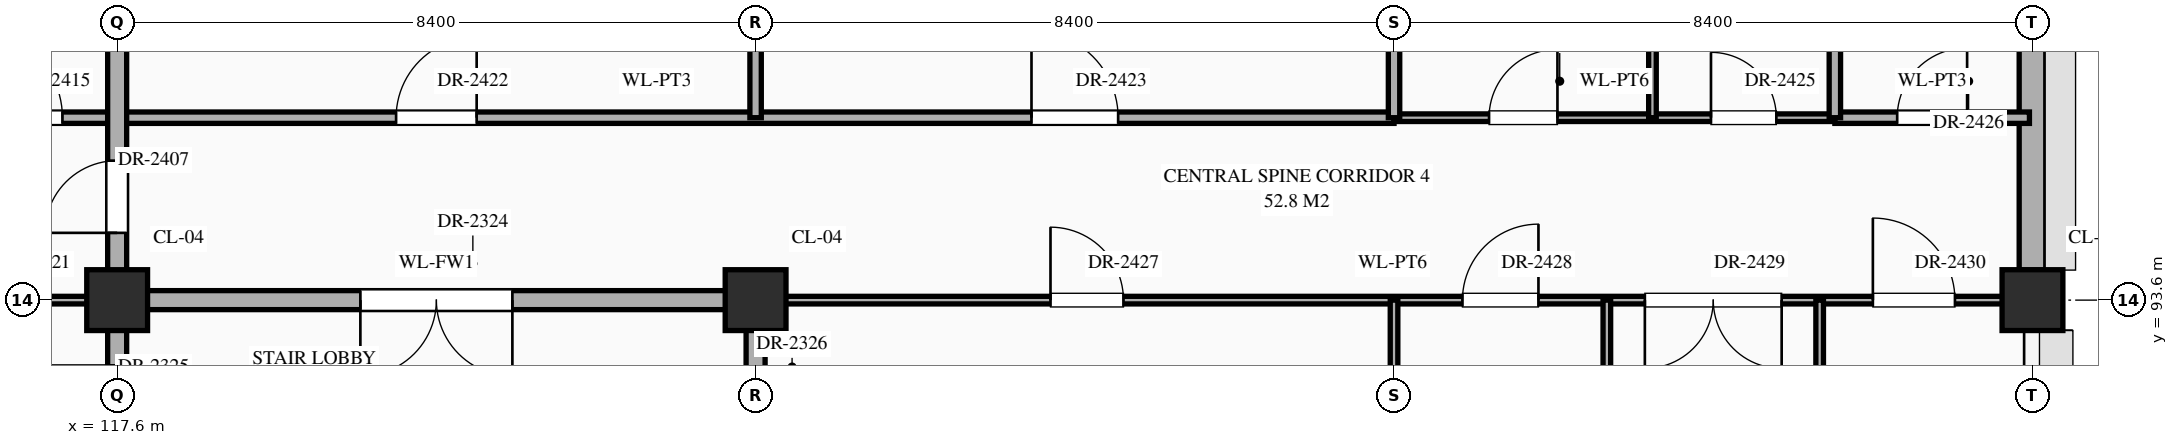
"""IFC4 building model, lengths in metres.
Left out: names, types, materials, properties, quantities, classifications, styles, units other than length and angle.
Written with IfcOpenShell. Run it as: python <this file> out.ifc"""

import sys

from ifc_helpers import new_model, si_unit, direction, frame, frame_2d, origin, origin_2d, place, context, subcontext, project, spatial, rectangle, extrude, element, fill, save


model = new_model("IFC4")
c1 = context("Model", 3, precision=1e-05, world=origin(), true_north=direction((0.0, 1.0)))
c2 = subcontext(c1, "Body", "Model", "MODEL_VIEW")
j1 = project(units=[si_unit("LENGTHUNIT", "METRE"), si_unit("PLANEANGLEUNIT", "RADIAN")], contexts=[c1])
p1 = place(None, origin())
s1 = spatial("IfcSite", under=j1, at=p1, CompositionType="ELEMENT")
p2 = place(p1, origin())
s2 = spatial("IfcBuilding", under=s1, at=p2, CompositionType="ELEMENT")
p3 = place(p2, frame((0.0, 0.0, 30.6)))
s3 = spatial("IfcBuildingStorey", under=s2, at=p3, CompositionType="ELEMENT", Elevation=30.6)
for number, where, z_axis, x_axis in (
    (1, (117.6, 93.6, 0.0), (0.0, 0.0, 1.0), (1.0, 0.0, 0.0)),
    (2, (126.0, 93.6, 0.0), (0.0, 0.0, 1.0), (1.0, 0.0, 0.0)),
    (3, (142.8, 93.6, 0.0), (0.0, 0.0, 1.0), (1.0, 0.0, 0.0)),
):
    element("IfcColumn", number, at=place(p3, frame(where, z_axis=z_axis, x_axis=x_axis)), inside=s3, PredefinedType="COLUMN", context=c2, shape_type="SweptSolid", body=[
        extrude(rectangle(XDim=0.8, YDim=0.8, at=origin_2d()), origin(), (0.0, 0.0, 1.0), 4.5),
    ])
p4 = place(p3, frame((142.8, 93.995, 0.0), z_axis=(0.0, 0.0, 1.0), x_axis=(0.0, 1.0, 0.0)))
e4 = element("IfcWall", 4, at=p4, inside=s3, PredefinedType="STANDARD", context=c2, shape_type="SweptSolid", body=[
    extrude(rectangle(XDim=6.41, YDim=0.35, at=frame_2d((3.205, 0.0))), origin(), (0.0, 0.0, 1.0), 3.65),
])
p5 = place(p4, frame((4.055, 0.0, 0.85)))
e5 = element("IfcOpeningElement", 5, at=p5, cuts=e4, PredefinedType="OPENING", context=c2, shape_type="SweptSolid", body=[
    extrude(rectangle(XDim=0.9, YDim=2.12, at=frame_2d((0.45, 1.06))), frame((0.0, 0.187, 0.0), z_axis=(0.0, -1.0, 0.0), x_axis=(1.0, 0.0, 0.0)), (0.0, 0.0, 1.0), 0.374),
])
p6 = place(p3, frame((109.2, 93.6, 0.0), z_axis=(0.0, 0.0, 1.0), x_axis=(1.0, 0.0, 0.0)))
e6 = element("IfcWall", 6, at=p6, inside=s3, PredefinedType="STANDARD", context=c2, shape_type="SweptSolid", body=[
    extrude(rectangle(XDim=8.4, YDim=0.1, at=frame_2d((4.2, 0.0))), origin(), (0.0, 0.0, 1.0), 3.39),
])
p7 = place(p6, frame((1.09, 0.0, 0.0)))
e7 = element("IfcOpeningElement", 7, at=p7, cuts=e6, PredefinedType="OPENING", context=c2, shape_type="SweptSolid", body=[
    extrude(rectangle(XDim=0.94, YDim=2.3, at=frame_2d((0.47, 1.15))), frame((0.0, 0.062, 0.0), z_axis=(0.0, -1.0, 0.0), x_axis=(1.0, 0.0, 0.0)), (0.0, 0.0, 1.0), 0.124),
])
p8 = place(p6, frame((3.71, 0.0, 0.0)))
e8 = element("IfcOpeningElement", 8, at=p8, cuts=e6, PredefinedType="OPENING", context=c2, shape_type="SweptSolid", body=[
    extrude(rectangle(XDim=0.98, YDim=2.35, at=frame_2d((0.49, 1.175))), frame((0.0, 0.062, 0.0), z_axis=(0.0, -1.0, 0.0), x_axis=(1.0, 0.0, 0.0)), (0.0, 0.0, 1.0), 0.124),
])
p9 = place(p6, frame((6.33, 0.0, 0.0)))
e9 = element("IfcOpeningElement", 9, at=p9, cuts=e6, PredefinedType="OPENING", context=c2, shape_type="SweptSolid", body=[
    extrude(rectangle(XDim=1.02, YDim=2.4, at=frame_2d((0.51, 1.2))), frame((0.0, 0.062, 0.0), z_axis=(0.0, -1.0, 0.0), x_axis=(1.0, 0.0, 0.0)), (0.0, 0.0, 1.0), 0.124),
])
p10 = place(p3, frame((117.6, 93.6, 0.0), z_axis=(0.0, 0.0, 1.0), x_axis=(1.0, 0.0, 0.0)))
e10 = element("IfcWall", 10, at=p10, inside=s3, PredefinedType="STANDARD", context=c2, shape_type="SweptSolid", body=[
    extrude(rectangle(XDim=8.4, YDim=0.25, at=frame_2d((4.2, 0.0))), origin(), (0.0, 0.0, 1.0), 3.39),
])
p11 = place(p10, frame((3.2, 0.0, 0.0)))
e11 = element("IfcOpeningElement", 11, at=p11, cuts=e10, PredefinedType="OPENING", context=c2, shape_type="SweptSolid", body=[
    extrude(rectangle(XDim=2.0, YDim=2.4, at=frame_2d((1.0, 1.2))), frame((0.0, 0.137, 0.0), z_axis=(0.0, -1.0, 0.0), x_axis=(1.0, 0.0, 0.0)), (0.0, 0.0, 1.0), 0.274),
])
p12 = place(p3, frame((126.0, 93.6, 0.0), z_axis=(0.0, 0.0, 1.0), x_axis=(1.0, 0.0, 0.0)))
e12 = element("IfcWall", 12, at=p12, inside=s3, PredefinedType="STANDARD", context=c2, shape_type="SweptSolid", body=[
    extrude(rectangle(XDim=16.76, YDim=0.1, at=frame_2d((8.38, 0.0))), origin(), (0.0, 0.0, 1.0), 3.1),
])
p13 = place(p12, frame((3.88, 0.0, 0.0)))
e13 = element("IfcOpeningElement", 13, at=p13, cuts=e12, PredefinedType="OPENING", context=c2, shape_type="SweptSolid", body=[
    extrude(rectangle(XDim=0.96, YDim=2.2, at=frame_2d((0.48, 1.1))), frame((0.0, 0.062, 0.0), z_axis=(0.0, -1.0, 0.0), x_axis=(1.0, 0.0, 0.0)), (0.0, 0.0, 1.0), 0.124),
])
p14 = place(p12, frame((9.3, 0.0, 0.0)))
e14 = element("IfcOpeningElement", 14, at=p14, cuts=e12, PredefinedType="OPENING", context=c2, shape_type="SweptSolid", body=[
    extrude(rectangle(XDim=1.0, YDim=2.25, at=frame_2d((0.5, 1.125))), frame((0.0, 0.062, 0.0), z_axis=(0.0, -1.0, 0.0), x_axis=(1.0, 0.0, 0.0)), (0.0, 0.0, 1.0), 0.124),
])
p15 = place(p12, frame((11.7, 0.0, 0.0)))
e15 = element("IfcOpeningElement", 15, at=p15, cuts=e12, PredefinedType="OPENING", context=c2, shape_type="SweptSolid", body=[
    extrude(rectangle(XDim=1.8, YDim=2.5, at=frame_2d((0.9, 1.25))), frame((0.0, 0.062, 0.0), z_axis=(0.0, -1.0, 0.0), x_axis=(1.0, 0.0, 0.0)), (0.0, 0.0, 1.0), 0.124),
])
p16 = place(p12, frame((14.7, 0.0, 0.0)))
e16 = element("IfcOpeningElement", 16, at=p16, cuts=e12, PredefinedType="OPENING", context=c2, shape_type="SweptSolid", body=[
    extrude(rectangle(XDim=1.08, YDim=2.25, at=frame_2d((0.54, 1.125))), frame((0.0, 0.062, 0.0), z_axis=(0.0, -1.0, 0.0), x_axis=(1.0, 0.0, 0.0)), (0.0, 0.0, 1.0), 0.124),
])
p17 = place(p3, frame((115.0, 96.0, 0.0), z_axis=(0.0, 0.0, 1.0), x_axis=(1.0, 0.0, 0.0)))
e17 = element("IfcWall", 17, at=p17, inside=s3, PredefinedType="STANDARD", context=c2, shape_type="SweptSolid", body=[
    extrude(rectangle(XDim=19.4, YDim=0.15, at=frame_2d((9.7, 0.0))), origin(), (0.0, 0.0, 1.0), 4.24),
])
p18 = place(p17, frame((0.72, 0.0, 0.0)))
e18 = element("IfcOpeningElement", 18, at=p18, cuts=e17, PredefinedType="OPENING", context=c2, shape_type="SweptSolid", body=[
    extrude(rectangle(XDim=1.16, YDim=2.3, at=frame_2d((0.58, 1.15))), frame((0.0, 0.087, 0.0), z_axis=(0.0, -1.0, 0.0), x_axis=(1.0, 0.0, 0.0)), (0.0, 0.0, 1.0), 0.174),
])
p19 = place(p17, frame((6.27, 0.0, 0.0)))
e19 = element("IfcOpeningElement", 19, at=p19, cuts=e17, PredefinedType="OPENING", context=c2, shape_type="SweptSolid", body=[
    extrude(rectangle(XDim=1.06, YDim=2.4, at=frame_2d((0.53, 1.2))), frame((0.0, 0.087, 0.0), z_axis=(0.0, -1.0, 0.0), x_axis=(1.0, 0.0, 0.0)), (0.0, 0.0, 1.0), 0.174),
])
p20 = place(p17, frame((14.63, 0.0, 0.0)))
e20 = element("IfcOpeningElement", 20, at=p20, cuts=e17, PredefinedType="OPENING", context=c2, shape_type="SweptSolid", body=[
    extrude(rectangle(XDim=1.14, YDim=2.4, at=frame_2d((0.57, 1.2))), frame((0.0, 0.087, 0.0), z_axis=(0.0, -1.0, 0.0), x_axis=(1.0, 0.0, 0.0)), (0.0, 0.0, 1.0), 0.174),
])
p21 = place(p3, frame((134.4, 96.0, 0.0), z_axis=(0.0, 0.0, 1.0), x_axis=(1.0, 0.0, 0.0)))
e21 = element("IfcWall", 21, at=p21, inside=s3, PredefinedType="STANDARD", context=c2, shape_type="SweptSolid", body=[
    extrude(rectangle(XDim=5.8, YDim=0.1, at=frame_2d((2.9, 0.0))), origin(), (0.0, 0.0, 1.0), 4.3),
])
p22 = place(p21, frame((1.25, 0.0, 0.0)))
e22 = element("IfcOpeningElement", 22, at=p22, cuts=e21, PredefinedType="OPENING", context=c2, shape_type="SweptSolid", body=[
    extrude(rectangle(XDim=0.9, YDim=2.15, at=frame_2d((0.45, 1.075))), frame((0.0, 0.062, 0.0), z_axis=(0.0, -1.0, 0.0), x_axis=(1.0, 0.0, 0.0)), (0.0, 0.0, 1.0), 0.124),
])
p23 = place(p21, frame((4.17, 0.0, 0.0)))
e23 = element("IfcOpeningElement", 23, at=p23, cuts=e21, PredefinedType="OPENING", context=c2, shape_type="SweptSolid", body=[
    extrude(rectangle(XDim=0.86, YDim=2.1, at=frame_2d((0.43, 1.05))), frame((0.0, 0.062, 0.0), z_axis=(0.0, -1.0, 0.0), x_axis=(1.0, 0.0, 0.0)), (0.0, 0.0, 1.0), 0.124),
])
p24 = place(p3, frame((140.2, 96.0, 0.0), z_axis=(0.0, 0.0, 1.0), x_axis=(1.0, 0.0, 0.0)))
e24 = element("IfcWall", 24, at=p24, inside=s3, PredefinedType="STANDARD", context=c2, shape_type="SweptSolid", body=[
    extrude(rectangle(XDim=2.56, YDim=0.15, at=frame_2d((1.28, 0.0))), origin(), (0.0, 0.0, 1.0), 4.3),
])
p25 = place(p24, frame((0.82, 0.0, 0.0)))
e25 = element("IfcOpeningElement", 25, at=p25, cuts=e24, PredefinedType="OPENING", context=c2, shape_type="SweptSolid", body=[
    extrude(rectangle(XDim=0.92, YDim=2.15, at=frame_2d((0.46, 1.075))), frame((0.0, 0.087, 0.0), z_axis=(0.0, -1.0, 0.0), x_axis=(1.0, 0.0, 0.0)), (0.0, 0.0, 1.0), 0.174),
])
p26 = place(p3, frame((117.6, 91.2, 0.0), z_axis=(0.0, 0.0, 1.0), x_axis=(0.0, 1.0, 0.0)))
e26 = element("IfcWall", 26, at=p26, inside=s3, PredefinedType="STANDARD", context=c2, shape_type="SweptSolid", body=[
    extrude(rectangle(XDim=13.2, YDim=0.25, at=frame_2d((6.6, 0.0))), origin(), (0.0, 0.0, 1.0), 3.49),
])
p27 = place(p26, frame((0.54, 0.0, 0.0)))
e27 = element("IfcOpeningElement", 27, at=p27, cuts=e26, PredefinedType="OPENING", context=c2, shape_type="SweptSolid", body=[
    extrude(rectangle(XDim=1.0, YDim=2.2, at=frame_2d((0.5, 1.1))), frame((0.0, 0.137, 0.0), z_axis=(0.0, -1.0, 0.0), x_axis=(1.0, 0.0, 0.0)), (0.0, 0.0, 1.0), 0.274),
])
p28 = place(p26, frame((10.485, 0.0, 0.0)))
e28 = element("IfcOpeningElement", 28, at=p28, cuts=e26, PredefinedType="OPENING", context=c2, shape_type="SweptSolid", body=[
    extrude(rectangle(XDim=0.95, YDim=2.15, at=frame_2d((0.475, 1.075))), frame((0.0, 0.137, 0.0), z_axis=(0.0, -1.0, 0.0), x_axis=(1.0, 0.0, 0.0)), (0.0, 0.0, 1.0), 0.274),
])
p29 = place(p26, frame((3.285, 0.0, 0.0)))
e29 = element("IfcOpeningElement", 29, at=p29, cuts=e26, PredefinedType="OPENING", context=c2, shape_type="SweptSolid", body=[
    extrude(rectangle(XDim=0.95, YDim=2.15, at=frame_2d((0.475, 1.075))), frame((0.0, 0.137, 0.0), z_axis=(0.0, -1.0, 0.0), x_axis=(1.0, 0.0, 0.0)), (0.0, 0.0, 1.0), 0.274),
])
p30 = place(p3, frame((126.0, 91.2, 0.0), z_axis=(0.0, 0.0, 1.0), x_axis=(0.0, 1.0, 0.0)))
e30 = element("IfcWall", 30, at=p30, inside=s3, PredefinedType="STANDARD", context=c2, shape_type="SweptSolid", body=[
    extrude(rectangle(XDim=2.4, YDim=0.25, at=frame_2d((1.2, 0.0))), origin(), (0.0, 0.0, 1.0), 3.4),
])
p31 = place(p30, frame((0.565, 0.0, 0.0)))
e31 = element("IfcOpeningElement", 31, at=p31, cuts=e30, PredefinedType="OPENING", context=c2, shape_type="SweptSolid", body=[
    extrude(rectangle(XDim=0.95, YDim=2.15, at=frame_2d((0.475, 1.075))), frame((0.0, 0.137, 0.0), z_axis=(0.0, -1.0, 0.0), x_axis=(1.0, 0.0, 0.0)), (0.0, 0.0, 1.0), 0.274),
])
p32 = place(p3, frame((126.0, 96.0, 0.0), z_axis=(0.0, 0.0, 1.0), x_axis=(0.0, 1.0, 0.0)))
e32 = element("IfcWall", 32, at=p32, inside=s3, PredefinedType="STANDARD", context=c2, shape_type="SweptSolid", body=[
    extrude(rectangle(XDim=4.8, YDim=0.15, at=frame_2d((2.4, 0.0))), origin(), (0.0, 0.0, 1.0), 3.4),
])
p33 = place(p3, frame((134.4, 86.4, 0.0), z_axis=(0.0, 0.0, 1.0), x_axis=(0.0, 1.0, 0.0)))
e33 = element("IfcWall", 33, at=p33, inside=s3, PredefinedType="STANDARD", context=c2, shape_type="SweptSolid", body=[
    extrude(rectangle(XDim=7.2, YDim=0.1, at=frame_2d((3.6, 0.0))), origin(), (0.0, 0.0, 1.0), 4.15),
])
p34 = place(p3, frame((134.4, 96.0, 0.0), z_axis=(0.0, 0.0, 1.0), x_axis=(0.0, 1.0, 0.0)))
e34 = element("IfcWall", 34, at=p34, inside=s3, PredefinedType="STANDARD", context=c2, shape_type="SweptSolid", body=[
    extrude(rectangle(XDim=4.8, YDim=0.15, at=frame_2d((2.4, 0.0))), origin(), (0.0, 0.0, 1.0), 4.15),
])
p35 = place(p3, frame((137.2, 86.4, 0.0), z_axis=(0.0, 0.0, 1.0), x_axis=(0.0, 1.0, 0.0)))
e35 = element("IfcWall", 35, at=p35, inside=s3, PredefinedType="STANDARD", context=c2, shape_type="SweptSolid", body=[
    extrude(rectangle(XDim=7.2, YDim=0.1, at=frame_2d((3.6, 0.0))), origin(), (0.0, 0.0, 1.0), 4.3),
])
p36 = place(p35, frame((3.08, 0.0, 0.0)))
e36 = element("IfcOpeningElement", 36, at=p36, cuts=e35, PredefinedType="OPENING", context=c2, shape_type="SweptSolid", body=[
    extrude(rectangle(XDim=1.04, YDim=2.2, at=frame_2d((0.52, 1.1))), frame((0.0, 0.062, 0.0), z_axis=(0.0, -1.0, 0.0), x_axis=(1.0, 0.0, 0.0)), (0.0, 0.0, 1.0), 0.124),
])
p37 = place(p3, frame((137.8, 96.0, 0.0), z_axis=(0.0, 0.0, 1.0), x_axis=(0.0, 1.0, 0.0)))
e37 = element("IfcWall", 37, at=p37, inside=s3, PredefinedType="STANDARD", context=c2, shape_type="SweptSolid", body=[
    extrude(rectangle(XDim=4.8, YDim=0.1, at=frame_2d((2.4, 0.0))), origin(), (0.0, 0.0, 1.0), 4.3),
])
p38 = place(p37, frame((1.87, 0.0, 0.0)))
e38 = element("IfcOpeningElement", 38, at=p38, cuts=e37, PredefinedType="OPENING", context=c2, shape_type="SweptSolid", body=[
    extrude(rectangle(XDim=1.06, YDim=2.4, at=frame_2d((0.53, 1.2))), frame((0.0, 0.062, 0.0), z_axis=(0.0, -1.0, 0.0), x_axis=(1.0, 0.0, 0.0)), (0.0, 0.0, 1.0), 0.124),
])
p39 = place(p3, frame((140.0, 86.4, 0.0), z_axis=(0.0, 0.0, 1.0), x_axis=(0.0, 1.0, 0.0)))
e39 = element("IfcWall", 39, at=p39, inside=s3, PredefinedType="STANDARD", context=c2, shape_type="SweptSolid", body=[
    extrude(rectangle(XDim=7.2, YDim=0.1, at=frame_2d((3.6, 0.0))), origin(), (0.0, 0.0, 1.0), 4.3),
])
p40 = place(p39, frame((3.04, 0.0, 0.0)))
e40 = element("IfcOpeningElement", 40, at=p40, cuts=e39, PredefinedType="OPENING", context=c2, shape_type="SweptSolid", body=[
    extrude(rectangle(XDim=1.12, YDim=2.25, at=frame_2d((0.56, 1.125))), frame((0.0, 0.062, 0.0), z_axis=(0.0, -1.0, 0.0), x_axis=(1.0, 0.0, 0.0)), (0.0, 0.0, 1.0), 0.124),
])
p41 = place(p3, frame((140.2, 96.0, 0.0), z_axis=(0.0, 0.0, 1.0), x_axis=(0.0, 1.0, 0.0)))
e41 = element("IfcWall", 41, at=p41, inside=s3, PredefinedType="STANDARD", context=c2, shape_type="SweptSolid", body=[
    extrude(rectangle(XDim=4.8, YDim=0.15, at=frame_2d((2.4, 0.0))), origin(), (0.0, 0.0, 1.0), 4.3),
])
p42 = place(p41, frame((1.83, 0.0, 0.0)))
e42 = element("IfcOpeningElement", 42, at=p42, cuts=e41, PredefinedType="OPENING", context=c2, shape_type="SweptSolid", body=[
    extrude(rectangle(XDim=1.14, YDim=2.4, at=frame_2d((0.57, 1.2))), frame((0.0, 0.087, 0.0), z_axis=(0.0, -1.0, 0.0), x_axis=(1.0, 0.0, 0.0)), (0.0, 0.0, 1.0), 0.174),
])
p43 = place(p11, frame((2.0, 0.0, 0.0), z_axis=(0.0, 0.0, 1.0), x_axis=(-1.0, 0.0, 0.0)))
e43 = element("IfcDoor", 43, at=p43, inside=s3, OperationType="DOUBLE_DOOR_SINGLE_SWING", PredefinedType="DOOR", context=c2, shape_type="SweptSolid", body=[
    extrude(rectangle(XDim=2.0, YDim=2.4, at=frame_2d((1.0, 1.2))), frame((0.0, 0.025, 0.0), z_axis=(0.0, -1.0, 0.0), x_axis=(1.0, 0.0, 0.0)), (0.0, 0.0, 1.0), 0.05),
])
fill(e11, e43)
p44 = place(p29, origin())
e44 = element("IfcDoor", 44, at=p44, inside=s3, OperationType="SINGLE_SWING_LEFT", PredefinedType="DOOR", context=c2, shape_type="SweptSolid", body=[
    extrude(rectangle(XDim=0.95, YDim=2.15, at=frame_2d((0.475, 1.075))), frame((0.0, 0.025, 0.0), z_axis=(0.0, -1.0, 0.0), x_axis=(1.0, 0.0, 0.0)), (0.0, 0.0, 1.0), 0.05),
])
fill(e29, e44)
p45 = place(p18, origin())
e45 = element("IfcDoor", 45, at=p45, inside=s3, OperationType="SINGLE_SWING_LEFT", PredefinedType="DOOR", context=c2, shape_type="SweptSolid", body=[
    extrude(rectangle(XDim=1.16, YDim=2.3, at=frame_2d((0.58, 1.15))), frame((0.0, 0.025, 0.0), z_axis=(0.0, -1.0, 0.0), x_axis=(1.0, 0.0, 0.0)), (0.0, 0.0, 1.0), 0.05),
])
fill(e18, e45)
p46 = place(p19, origin())
e46 = element("IfcDoor", 46, at=p46, inside=s3, OperationType="SINGLE_SWING_RIGHT", PredefinedType="DOOR", context=c2, shape_type="SweptSolid", body=[
    extrude(rectangle(XDim=1.06, YDim=2.4, at=frame_2d((0.53, 1.2))), frame((0.0, 0.025, 0.0), z_axis=(0.0, -1.0, 0.0), x_axis=(1.0, 0.0, 0.0)), (0.0, 0.0, 1.0), 0.05),
])
fill(e19, e46)
p47 = place(p20, origin())
e47 = element("IfcDoor", 47, at=p47, inside=s3, OperationType="SINGLE_SWING_LEFT", PredefinedType="DOOR", context=c2, shape_type="SweptSolid", body=[
    extrude(rectangle(XDim=1.14, YDim=2.4, at=frame_2d((0.57, 1.2))), frame((0.0, 0.025, 0.0), z_axis=(0.0, -1.0, 0.0), x_axis=(1.0, 0.0, 0.0)), (0.0, 0.0, 1.0), 0.05),
])
fill(e20, e47)
p48 = place(p22, origin())
e48 = element("IfcDoor", 48, at=p48, inside=s3, OperationType="SINGLE_SWING_RIGHT", PredefinedType="DOOR", context=c2, shape_type="SweptSolid", body=[
    extrude(rectangle(XDim=0.9, YDim=2.15, at=frame_2d((0.45, 1.075))), frame((0.0, 0.025, 0.0), z_axis=(0.0, -1.0, 0.0), x_axis=(1.0, 0.0, 0.0)), (0.0, 0.0, 1.0), 0.05),
])
fill(e22, e48)
p49 = place(p23, origin())
e49 = element("IfcDoor", 49, at=p49, inside=s3, OperationType="SINGLE_SWING_LEFT", PredefinedType="DOOR", context=c2, shape_type="SweptSolid", body=[
    extrude(rectangle(XDim=0.86, YDim=2.1, at=frame_2d((0.43, 1.05))), frame((0.0, 0.025, 0.0), z_axis=(0.0, -1.0, 0.0), x_axis=(1.0, 0.0, 0.0)), (0.0, 0.0, 1.0), 0.05),
])
fill(e23, e49)
p50 = place(p25, origin())
e50 = element("IfcDoor", 50, at=p50, inside=s3, OperationType="SINGLE_SWING_RIGHT", PredefinedType="DOOR", context=c2, shape_type="SweptSolid", body=[
    extrude(rectangle(XDim=0.92, YDim=2.15, at=frame_2d((0.46, 1.075))), frame((0.0, 0.025, 0.0), z_axis=(0.0, -1.0, 0.0), x_axis=(1.0, 0.0, 0.0)), (0.0, 0.0, 1.0), 0.05),
])
fill(e25, e50)
p51 = place(p13, origin())
e51 = element("IfcDoor", 51, at=p51, inside=s3, OperationType="SINGLE_SWING_LEFT", PredefinedType="DOOR", context=c2, shape_type="SweptSolid", body=[
    extrude(rectangle(XDim=0.96, YDim=2.2, at=frame_2d((0.48, 1.1))), frame((0.0, 0.025, 0.0), z_axis=(0.0, -1.0, 0.0), x_axis=(1.0, 0.0, 0.0)), (0.0, 0.0, 1.0), 0.05),
])
fill(e13, e51)
p52 = place(p14, origin())
e52 = element("IfcDoor", 52, at=p52, inside=s3, OperationType="SINGLE_SWING_RIGHT", PredefinedType="DOOR", context=c2, shape_type="SweptSolid", body=[
    extrude(rectangle(XDim=1.0, YDim=2.25, at=frame_2d((0.5, 1.125))), frame((0.0, 0.025, 0.0), z_axis=(0.0, -1.0, 0.0), x_axis=(1.0, 0.0, 0.0)), (0.0, 0.0, 1.0), 0.05),
])
fill(e14, e52)
p53 = place(p15, frame((1.8, 0.0, 0.0), z_axis=(0.0, 0.0, 1.0), x_axis=(-1.0, 0.0, 0.0)))
e53 = element("IfcDoor", 53, at=p53, inside=s3, OperationType="DOUBLE_DOOR_SINGLE_SWING", PredefinedType="DOOR", context=c2, shape_type="SweptSolid", body=[
    extrude(rectangle(XDim=1.8, YDim=2.5, at=frame_2d((0.9, 1.25))), frame((0.0, 0.025, 0.0), z_axis=(0.0, -1.0, 0.0), x_axis=(1.0, 0.0, 0.0)), (0.0, 0.0, 1.0), 0.05),
])
fill(e15, e53)
p54 = place(p16, origin())
e54 = element("IfcDoor", 54, at=p54, inside=s3, OperationType="SINGLE_SWING_LEFT", PredefinedType="DOOR", context=c2, shape_type="SweptSolid", body=[
    extrude(rectangle(XDim=1.08, YDim=2.25, at=frame_2d((0.54, 1.125))), frame((0.0, 0.025, 0.0), z_axis=(0.0, -1.0, 0.0), x_axis=(1.0, 0.0, 0.0)), (0.0, 0.0, 1.0), 0.05),
])
fill(e16, e54)
save(model, sys.argv[1])
